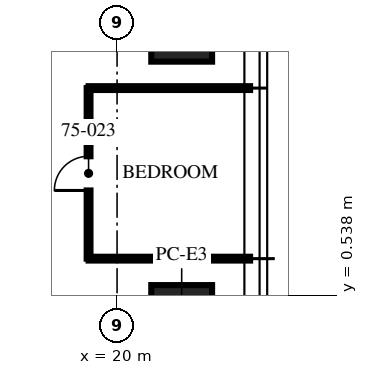
"""IFC4 building model, lengths in metres.
Left out: names, types, materials, properties, quantities, classifications, styles, units other than length and angle.
Written with IfcOpenShell. Run it as: python <this file> out.ifc"""

import sys

from ifc_helpers import new_model, si_unit, direction, frame, frame_2d, origin, origin_2d, place, context, subcontext, project, spatial, rectangle, extrude, element, fill, save


model = new_model("IFC4")
c1 = context("Model", 3, precision=1e-05, world=origin(), true_north=direction((0.0, 1.0)))
c2 = subcontext(c1, "Body", "Model", "MODEL_VIEW")
j1 = project(units=[si_unit("LENGTHUNIT", "METRE"), si_unit("PLANEANGLEUNIT", "RADIAN")], contexts=[c1])
p1 = place(None, origin())
s1 = spatial("IfcSite", under=j1, at=p1, CompositionType="ELEMENT")
p2 = place(p1, origin())
s2 = spatial("IfcBuilding", under=s1, at=p2, CompositionType="ELEMENT")
p3 = place(p2, frame((0.0, 0.0, 300.75)))
s3 = spatial("IfcBuildingStorey", under=s2, at=p3, CompositionType="ELEMENT", Elevation=300.75)
for number, where, z_axis, x_axis in (
    (1, (21.7, 7.48, 0.0), (0.0, 0.0, 1.0), (0.0, 1.0, 0.0)),
    (2, (21.7, 0.0, 0.0), (0.0, 0.0, 1.0), (0.0, 1.0, 0.0)),
):
    element("IfcColumn", number, at=place(p3, frame(where, z_axis=z_axis, x_axis=x_axis)), inside=s3, PredefinedType="COLUMN", context=c2, shape_type="SweptSolid", body=[
        extrude(rectangle(XDim=1.6, YDim=1.6, at=origin_2d()), origin(), (0.0, 0.0, 1.0), 3.75),
    ])
for number, where, z_axis, x_axis in (
    (3, (19.25, 1.496, 0.0), (0.0, 0.0, 1.0), (1.0, 0.0, 0.0)),
    (4, (19.25, 5.984, 0.0), (0.0, 0.0, 1.0), (1.0, 0.0, 0.0)),
):
    element("IfcWall", number, at=place(p3, frame(where, z_axis=z_axis, x_axis=x_axis)), inside=s3, PredefinedType="PARTITIONING", context=c2, shape_type="SweptSolid", body=[
        extrude(rectangle(XDim=4.25, YDim=0.1, at=frame_2d((2.125, 0.0))), origin(), (0.0, 0.0, 1.0), 3.01),
    ])
p4 = place(p3, frame((19.25, 1.496, 0.0), z_axis=(0.0, 0.0, 1.0), x_axis=(0.0, 1.0, 0.0)))
e5 = element("IfcWall", 5, at=p4, inside=s3, PredefinedType="PARTITIONING", context=c2, shape_type="SweptSolid", body=[
    extrude(rectangle(XDim=4.488, YDim=0.1, at=frame_2d((2.244, 0.0))), origin(), (0.0, 0.0, 1.0), 2.91),
])
p5 = place(p4, frame((1.794, 0.0, 0.0)))
e6 = element("IfcOpeningElement", 6, at=p5, cuts=e5, PredefinedType="OPENING", context=c2, shape_type="SweptSolid", body=[
    extrude(rectangle(XDim=0.9, YDim=2.1, at=frame_2d((0.45, 1.05))), frame((0.0, 0.06, 0.0), z_axis=(0.0, -1.0, 0.0), x_axis=(1.0, 0.0, 0.0)), (0.0, 0.0, 1.0), 0.12),
])
p6 = place(p5, origin())
e7 = element("IfcDoor", 7, at=p6, inside=s3, OperationType="SINGLE_SWING_LEFT", PredefinedType="DOOR", context=c2, shape_type="SweptSolid", body=[
    extrude(rectangle(XDim=0.9, YDim=2.1, at=frame_2d((0.45, 1.05))), frame((0.0, 0.025, 0.0), z_axis=(0.0, -1.0, 0.0), x_axis=(1.0, 0.0, 0.0)), (0.0, 0.0, 1.0), 0.05),
])
fill(e6, e7)
save(model, sys.argv[1])
